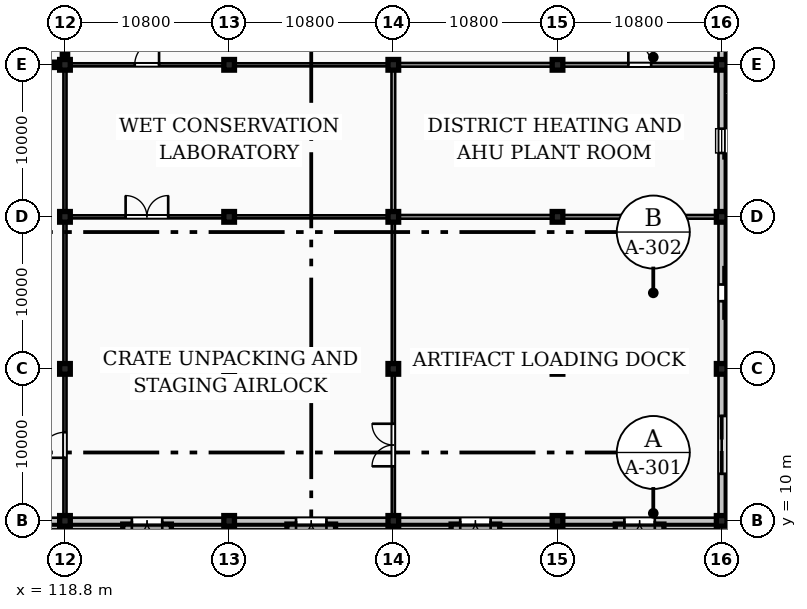
"""IFC4 building model, lengths in metres.
Left out: names, types, materials, properties, quantities, classifications, styles, units other than length and angle.
Written with IfcOpenShell. Run it as: python <this file> out.ifc"""

import sys

from ifc_helpers import new_model, si_unit, direction, frame, frame_2d, origin, origin_2d, place, context, subcontext, project, spatial, rectangle, extrude, element, fill, save


model = new_model("IFC4")
c1 = context("Model", 3, precision=1e-05, world=origin(), true_north=direction((0.0, 1.0)))
c2 = subcontext(c1, "Body", "Model", "MODEL_VIEW")
j1 = project(units=[si_unit("LENGTHUNIT", "METRE"), si_unit("PLANEANGLEUNIT", "RADIAN")], contexts=[c1])
p1 = place(None, origin())
s1 = spatial("IfcSite", under=j1, at=p1, CompositionType="ELEMENT")
p2 = place(p1, origin())
s2 = spatial("IfcBuilding", under=s1, at=p2, CompositionType="ELEMENT")
p3 = place(p2, origin())
s3 = spatial("IfcBuildingStorey", under=s2, at=p3, CompositionType="ELEMENT", Elevation=0.0)
for number, where, z_axis, x_axis in (
    (1, (118.8, 10.0, 0.0), (0.0, 0.0, 1.0), (1.0, 0.0, 0.0)),
    (2, (118.8, 20.0, 0.0), (0.0, 0.0, 1.0), (1.0, 0.0, 0.0)),
    (3, (118.8, 30.0, 0.0), (0.0, 0.0, 1.0), (1.0, 0.0, 0.0)),
    (4, (118.8, 40.0, 0.0), (0.0, 0.0, 1.0), (1.0, 0.0, 0.0)),
    (5, (129.6, 10.0, 0.0), (0.0, 0.0, 1.0), (1.0, 0.0, 0.0)),
    (6, (129.6, 20.0, 0.0), (0.0, 0.0, 1.0), (1.0, 0.0, 0.0)),
    (7, (129.6, 30.0, 0.0), (0.0, 0.0, 1.0), (1.0, 0.0, 0.0)),
    (8, (129.6, 40.0, 0.0), (0.0, 0.0, 1.0), (1.0, 0.0, 0.0)),
    (9, (140.4, 10.0, 0.0), (0.0, 0.0, 1.0), (1.0, 0.0, 0.0)),
    (10, (140.4, 20.0, 0.0), (0.0, 0.0, 1.0), (1.0, 0.0, 0.0)),
    (11, (140.4, 30.0, 0.0), (0.0, 0.0, 1.0), (1.0, 0.0, 0.0)),
    (12, (140.4, 40.0, 0.0), (0.0, 0.0, 1.0), (1.0, 0.0, 0.0)),
    (13, (151.2, 10.0, 0.0), (0.0, 0.0, 1.0), (1.0, 0.0, 0.0)),
    (14, (151.2, 20.0, 0.0), (0.0, 0.0, 1.0), (1.0, 0.0, 0.0)),
    (15, (151.2, 30.0, 0.0), (0.0, 0.0, 1.0), (1.0, 0.0, 0.0)),
    (16, (151.2, 40.0, 0.0), (0.0, 0.0, 1.0), (1.0, 0.0, 0.0)),
    (17, (162.0, 10.0, 0.0), (0.0, 0.0, 1.0), (1.0, 0.0, 0.0)),
    (18, (162.0, 20.0, 0.0), (0.0, 0.0, 1.0), (1.0, 0.0, 0.0)),
    (19, (162.0, 30.0, 0.0), (0.0, 0.0, 1.0), (1.0, 0.0, 0.0)),
    (20, (162.0, 40.0, 0.0), (0.0, 0.0, 1.0), (1.0, 0.0, 0.0)),
):
    element("IfcColumn", number, at=place(p3, frame(where, z_axis=z_axis, x_axis=x_axis)), inside=s3, PredefinedType="COLUMN", context=c2, shape_type="SweptSolid", body=[
        extrude(rectangle(XDim=0.7, YDim=0.7, at=origin_2d()), origin(), (0.0, 0.0, 1.0), 4.8),
    ])
p4 = place(p3, frame((108.2, 9.57, -1.38), z_axis=(0.0, 0.0, 1.0), x_axis=(1.0, 0.0, 0.0)))
e21 = element("IfcWall", 21, at=p4, inside=s3, PredefinedType="PARAPET", context=c2, shape_type="SweptSolid", body=[
    extrude(rectangle(XDim=53.6, YDim=0.26, at=frame_2d((26.8, 0.0))), origin(), (0.0, 0.0, 1.0), 1.36),
])
p5 = place(p3, frame((162.43, 10.45, -1.38), z_axis=(0.0, 0.0, 1.0), x_axis=(0.0, 1.0, 0.0)))
e22 = element("IfcWall", 22, at=p5, inside=s3, PredefinedType="PARAPET", context=c2, shape_type="SweptSolid", body=[
    extrude(rectangle(XDim=27.55, YDim=0.26, at=frame_2d((13.775, 0.0))), origin(), (0.0, 0.0, 1.0), 2.78),
])
p6 = place(p3, frame((162.43, 38.2, -1.38), z_axis=(0.0, 0.0, 1.0), x_axis=(0.0, 1.0, 0.0)))
e23 = element("IfcWall", 23, at=p6, inside=s3, PredefinedType="PARAPET", context=c2, shape_type="SweptSolid", body=[
    extrude(rectangle(XDim=23.35, YDim=0.26, at=frame_2d((11.675, 0.0))), origin(), (0.0, 0.0, 1.0), 4.18),
])
p7 = place(p3, frame((108.145, 10.0, 0.0), z_axis=(0.0, 0.0, 1.0), x_axis=(1.0, 0.0, 0.0)))
e24 = element("IfcWall", 24, at=p7, inside=s3, PredefinedType="STANDARD", context=c2, shape_type="SweptSolid", body=[
    extrude(rectangle(XDim=10.51, YDim=0.42, at=frame_2d((5.255, 0.0))), origin(), (0.0, 0.0, 1.0), 3.819),
])
p8 = place(p7, frame((4.255, 0.0, 0.0)))
e25 = element("IfcOpeningElement", 25, at=p8, cuts=e24, PredefinedType="OPENING", context=c2, shape_type="SweptSolid", body=[
    extrude(rectangle(XDim=2.0, YDim=2.3, at=frame_2d((1.0, 1.15))), frame((0.0, 0.22, 0.0), z_axis=(0.0, -1.0, 0.0), x_axis=(1.0, 0.0, 0.0)), (0.0, 0.0, 1.0), 0.44),
])
p9 = place(p3, frame((118.945, 10.0, 0.0), z_axis=(0.0, 0.0, 1.0), x_axis=(1.0, 0.0, 0.0)))
e26 = element("IfcWall", 26, at=p9, inside=s3, PredefinedType="STANDARD", context=c2, shape_type="SweptSolid", body=[
    extrude(rectangle(XDim=10.51, YDim=0.42, at=frame_2d((5.255, 0.0))), origin(), (0.0, 0.0, 1.0), 3.819),
])
p10 = place(p9, frame((4.255, 0.0, 0.0)))
e27 = element("IfcOpeningElement", 27, at=p10, cuts=e26, PredefinedType="OPENING", context=c2, shape_type="SweptSolid", body=[
    extrude(rectangle(XDim=2.0, YDim=2.3, at=frame_2d((1.0, 1.15))), frame((0.0, 0.22, 0.0), z_axis=(0.0, -1.0, 0.0), x_axis=(1.0, 0.0, 0.0)), (0.0, 0.0, 1.0), 0.44),
])
p11 = place(p3, frame((129.745, 10.0, 0.0), z_axis=(0.0, 0.0, 1.0), x_axis=(1.0, 0.0, 0.0)))
e28 = element("IfcWall", 28, at=p11, inside=s3, PredefinedType="STANDARD", context=c2, shape_type="SweptSolid", body=[
    extrude(rectangle(XDim=10.51, YDim=0.42, at=frame_2d((5.255, 0.0))), origin(), (0.0, 0.0, 1.0), 3.819),
])
p12 = place(p11, frame((4.255, 0.0, 0.0)))
e29 = element("IfcOpeningElement", 29, at=p12, cuts=e28, PredefinedType="OPENING", context=c2, shape_type="SweptSolid", body=[
    extrude(rectangle(XDim=2.0, YDim=2.3, at=frame_2d((1.0, 1.15))), frame((0.0, 0.22, 0.0), z_axis=(0.0, -1.0, 0.0), x_axis=(1.0, 0.0, 0.0)), (0.0, 0.0, 1.0), 0.44),
])
p13 = place(p3, frame((140.545, 10.0, 0.0), z_axis=(0.0, 0.0, 1.0), x_axis=(1.0, 0.0, 0.0)))
e30 = element("IfcWall", 30, at=p13, inside=s3, PredefinedType="STANDARD", context=c2, shape_type="SweptSolid", body=[
    extrude(rectangle(XDim=10.51, YDim=0.42, at=frame_2d((5.255, 0.0))), origin(), (0.0, 0.0, 1.0), 3.819),
])
p14 = place(p13, frame((4.255, 0.0, 0.0)))
e31 = element("IfcOpeningElement", 31, at=p14, cuts=e30, PredefinedType="OPENING", context=c2, shape_type="SweptSolid", body=[
    extrude(rectangle(XDim=2.0, YDim=2.3, at=frame_2d((1.0, 1.15))), frame((0.0, 0.22, 0.0), z_axis=(0.0, -1.0, 0.0), x_axis=(1.0, 0.0, 0.0)), (0.0, 0.0, 1.0), 0.44),
])
p15 = place(p3, frame((151.345, 10.0, 0.0), z_axis=(0.0, 0.0, 1.0), x_axis=(1.0, 0.0, 0.0)))
e32 = element("IfcWall", 32, at=p15, inside=s3, PredefinedType="STANDARD", context=c2, shape_type="SweptSolid", body=[
    extrude(rectangle(XDim=10.51, YDim=0.42, at=frame_2d((5.255, 0.0))), origin(), (0.0, 0.0, 1.0), 4.13),
])
p16 = place(p15, frame((4.255, 0.0, 0.0)))
e33 = element("IfcOpeningElement", 33, at=p16, cuts=e32, PredefinedType="OPENING", context=c2, shape_type="SweptSolid", body=[
    extrude(rectangle(XDim=2.0, YDim=2.3, at=frame_2d((1.0, 1.15))), frame((0.0, 0.22, 0.0), z_axis=(0.0, -1.0, 0.0), x_axis=(1.0, 0.0, 0.0)), (0.0, 0.0, 1.0), 0.44),
])
p17 = place(p3, frame((162.0, 10.145, 0.0), z_axis=(0.0, 0.0, 1.0), x_axis=(0.0, 1.0, 0.0)))
e34 = element("IfcWall", 34, at=p17, inside=s3, PredefinedType="STANDARD", context=c2, shape_type="SweptSolid", body=[
    extrude(rectangle(XDim=9.71, YDim=0.42, at=frame_2d((4.855, 0.0))), origin(), (0.0, 0.0, 1.0), 4.13),
])
p18 = place(p17, frame((2.955, 0.0, 0.0)))
e35 = element("IfcOpeningElement", 35, at=p18, cuts=e34, PredefinedType="OPENING", context=c2, shape_type="SweptSolid", body=[
    extrude(rectangle(XDim=3.8, YDim=4.0, at=frame_2d((1.9, 2.0))), frame((0.0, 0.22, 0.0), z_axis=(0.0, -1.0, 0.0), x_axis=(1.0, 0.0, 0.0)), (0.0, 0.0, 1.0), 0.44),
])
p19 = place(p3, frame((162.0, 20.145, 0.0), z_axis=(0.0, 0.0, 1.0), x_axis=(0.0, 1.0, 0.0)))
e36 = element("IfcWall", 36, at=p19, inside=s3, PredefinedType="STANDARD", context=c2, shape_type="SweptSolid", body=[
    extrude(rectangle(XDim=9.71, YDim=0.42, at=frame_2d((4.855, 0.0))), origin(), (0.0, 0.0, 1.0), 4.13),
])
p20 = place(p19, frame((4.305, 0.0, 0.0)))
e37 = element("IfcOpeningElement", 37, at=p20, cuts=e36, PredefinedType="OPENING", context=c2, shape_type="SweptSolid", body=[
    extrude(rectangle(XDim=1.1, YDim=2.2, at=frame_2d((0.55, 1.1))), frame((0.0, 0.22, 0.0), z_axis=(0.0, -1.0, 0.0), x_axis=(1.0, 0.0, 0.0)), (0.0, 0.0, 1.0), 0.44),
])
p21 = place(p3, frame((162.0, 30.145, 0.0), z_axis=(0.0, 0.0, 1.0), x_axis=(0.0, 1.0, 0.0)))
e38 = element("IfcWall", 38, at=p21, inside=s3, PredefinedType="STANDARD", context=c2, shape_type="SweptSolid", body=[
    extrude(rectangle(XDim=9.71, YDim=0.42, at=frame_2d((4.855, 0.0))), origin(), (0.0, 0.0, 1.0), 4.13),
])
p22 = place(p21, frame((4.055, 0.0, 1.2)))
e39 = element("IfcOpeningElement", 39, at=p22, cuts=e38, PredefinedType="OPENING", context=c2, shape_type="SweptSolid", body=[
    extrude(rectangle(XDim=1.6, YDim=1.8, at=frame_2d((0.8, 0.9))), frame((0.0, 0.22, 0.0), z_axis=(0.0, -1.0, 0.0), x_axis=(1.0, 0.0, 0.0)), (0.0, 0.0, 1.0), 0.44),
])
p23 = place(p3, frame((162.0, 40.145, 0.0), z_axis=(0.0, 0.0, 1.0), x_axis=(0.0, 1.0, 0.0)))
e40 = element("IfcWall", 40, at=p23, inside=s3, PredefinedType="STANDARD", context=c2, shape_type="SweptSolid", body=[
    extrude(rectangle(XDim=9.71, YDim=0.42, at=frame_2d((4.855, 0.0))), origin(), (0.0, 0.0, 1.0), 4.13),
])
p24 = place(p23, frame((4.055, 0.0, 1.2)))
e41 = element("IfcOpeningElement", 41, at=p24, cuts=e40, PredefinedType="OPENING", context=c2, shape_type="SweptSolid", body=[
    extrude(rectangle(XDim=1.6, YDim=1.8, at=frame_2d((0.8, 0.9))), frame((0.0, 0.22, 0.0), z_axis=(0.0, -1.0, 0.0), x_axis=(1.0, 0.0, 0.0)), (0.0, 0.0, 1.0), 0.44),
])
p25 = place(p3, frame((108.35, 40.0, 0.0), z_axis=(0.0, 0.0, 1.0), x_axis=(1.0, 0.0, 0.0)))
e42 = element("IfcWall", 42, at=p25, inside=s3, PredefinedType="SHEAR", context=c2, shape_type="SweptSolid", body=[
    extrude(rectangle(XDim=10.1, YDim=0.35, at=frame_2d((5.05, 0.0))), origin(), (0.0, 0.0, 1.0), 4.56),
])
p26 = place(p3, frame((118.8, 40.35, 0.0), z_axis=(0.0, 0.0, 1.0), x_axis=(0.0, 1.0, 0.0)))
e43 = element("IfcWall", 43, at=p26, inside=s3, PredefinedType="SHEAR", context=c2, shape_type="SweptSolid", body=[
    extrude(rectangle(XDim=9.3, YDim=0.35, at=frame_2d((4.65, 0.0))), origin(), (0.0, 0.0, 1.0), 4.56),
])
p27 = place(p26, frame((0.83, 0.0, 0.0)))
e44 = element("IfcOpeningElement", 44, at=p27, cuts=e43, PredefinedType="OPENING", context=c2, shape_type="SweptSolid", body=[
    extrude(rectangle(XDim=1.8, YDim=2.25, at=frame_2d((0.9, 1.125))), frame((0.0, 0.185, 0.0), z_axis=(0.0, -1.0, 0.0), x_axis=(1.0, 0.0, 0.0)), (0.0, 0.0, 1.0), 0.37),
])
p28 = place(p3, frame((118.98, 30.0, 0.0), z_axis=(0.0, 0.0, 1.0), x_axis=(1.0, 0.0, 0.0)))
e45 = element("IfcWall", 45, at=p28, inside=s3, PredefinedType="SOLIDWALL", context=c2, shape_type="SweptSolid", body=[
    extrude(rectangle(XDim=10.42, YDim=0.2, at=frame_2d((5.21, 0.0))), origin(), (0.0, 0.0, 1.0), 3.819),
])
p29 = place(p28, frame((3.81, 0.0, 0.0)))
e46 = element("IfcOpeningElement", 46, at=p29, cuts=e45, PredefinedType="OPENING", context=c2, shape_type="SweptSolid", body=[
    extrude(rectangle(XDim=2.8, YDim=2.9, at=frame_2d((1.4, 1.45))), frame((0.0, 0.11, 0.0), z_axis=(0.0, -1.0, 0.0), x_axis=(1.0, 0.0, 0.0)), (0.0, 0.0, 1.0), 0.22),
])
p30 = place(p3, frame((129.8, 30.0, 0.0), z_axis=(0.0, 0.0, 1.0), x_axis=(1.0, 0.0, 0.0)))
e47 = element("IfcWall", 47, at=p30, inside=s3, PredefinedType="SOLIDWALL", context=c2, shape_type="SweptSolid", body=[
    extrude(rectangle(XDim=10.4, YDim=0.2, at=frame_2d((5.2, 0.0))), origin(), (0.0, 0.0, 1.0), 3.819),
])
p31 = place(p3, frame((118.98, 40.0, 0.0), z_axis=(0.0, 0.0, 1.0), x_axis=(1.0, 0.0, 0.0)))
e48 = element("IfcWall", 48, at=p31, inside=s3, PredefinedType="SOLIDWALL", context=c2, shape_type="SweptSolid", body=[
    extrude(rectangle(XDim=10.42, YDim=0.2, at=frame_2d((5.21, 0.0))), origin(), (0.0, 0.0, 1.0), 3.819),
])
p32 = place(p31, frame((4.41, 0.0, 0.0)))
e49 = element("IfcOpeningElement", 49, at=p32, cuts=e48, PredefinedType="OPENING", context=c2, shape_type="SweptSolid", body=[
    extrude(rectangle(XDim=1.6, YDim=2.3, at=frame_2d((0.8, 1.15))), frame((0.0, 0.11, 0.0), z_axis=(0.0, -1.0, 0.0), x_axis=(1.0, 0.0, 0.0)), (0.0, 0.0, 1.0), 0.22),
])
p33 = place(p3, frame((129.8, 40.0, 0.0), z_axis=(0.0, 0.0, 1.0), x_axis=(1.0, 0.0, 0.0)))
e50 = element("IfcWall", 50, at=p33, inside=s3, PredefinedType="SOLIDWALL", context=c2, shape_type="SweptSolid", body=[
    extrude(rectangle(XDim=10.4, YDim=0.2, at=frame_2d((5.2, 0.0))), origin(), (0.0, 0.0, 1.0), 3.819),
])
p34 = place(p3, frame((140.6, 40.0, 0.0), z_axis=(0.0, 0.0, 1.0), x_axis=(1.0, 0.0, 0.0)))
e51 = element("IfcWall", 51, at=p34, inside=s3, PredefinedType="SOLIDWALL", context=c2, shape_type="SweptSolid", body=[
    extrude(rectangle(XDim=10.4, YDim=0.24, at=frame_2d((5.2, 0.0))), origin(), (0.0, 0.0, 1.0), 3.819),
])
p35 = place(p3, frame((151.4, 40.0, 0.0), z_axis=(0.0, 0.0, 1.0), x_axis=(1.0, 0.0, 0.0)))
e52 = element("IfcWall", 52, at=p35, inside=s3, PredefinedType="SOLIDWALL", context=c2, shape_type="SweptSolid", body=[
    extrude(rectangle(XDim=10.42, YDim=0.24, at=frame_2d((5.21, 0.0))), origin(), (0.0, 0.0, 1.0), 4.13),
])
p36 = place(p35, frame((4.46, 0.0, 0.0)))
e53 = element("IfcOpeningElement", 53, at=p36, cuts=e52, PredefinedType="OPENING", context=c2, shape_type="SweptSolid", body=[
    extrude(rectangle(XDim=1.5, YDim=2.3, at=frame_2d((0.75, 1.15))), frame((0.0, 0.13, 0.0), z_axis=(0.0, -1.0, 0.0), x_axis=(1.0, 0.0, 0.0)), (0.0, 0.0, 1.0), 0.26),
])
p37 = place(p3, frame((118.8, 10.18, 0.0), z_axis=(0.0, 0.0, 1.0), x_axis=(0.0, 1.0, 0.0)))
e54 = element("IfcWall", 54, at=p37, inside=s3, PredefinedType="SOLIDWALL", context=c2, shape_type="SweptSolid", body=[
    extrude(rectangle(XDim=9.62, YDim=0.2, at=frame_2d((4.81, 0.0))), origin(), (0.0, 0.0, 1.0), 3.97),
])
p38 = place(p37, frame((3.97, 0.0, 0.0)))
e55 = element("IfcOpeningElement", 55, at=p38, cuts=e54, PredefinedType="OPENING", context=c2, shape_type="SweptSolid", body=[
    extrude(rectangle(XDim=1.68, YDim=2.52, at=frame_2d((0.84, 1.26))), frame((0.0, 0.11, 0.0), z_axis=(0.0, -1.0, 0.0), x_axis=(1.0, 0.0, 0.0)), (0.0, 0.0, 1.0), 0.22),
])
p39 = place(p3, frame((118.8, 20.2, 0.0), z_axis=(0.0, 0.0, 1.0), x_axis=(0.0, 1.0, 0.0)))
e56 = element("IfcWall", 56, at=p39, inside=s3, PredefinedType="SOLIDWALL", context=c2, shape_type="SweptSolid", body=[
    extrude(rectangle(XDim=9.6, YDim=0.2, at=frame_2d((4.8, 0.0))), origin(), (0.0, 0.0, 1.0), 3.97),
])
p40 = place(p3, frame((140.4, 10.18, 0.0), z_axis=(0.0, 0.0, 1.0), x_axis=(0.0, 1.0, 0.0)))
e57 = element("IfcWall", 57, at=p40, inside=s3, PredefinedType="SOLIDWALL", context=c2, shape_type="SweptSolid", body=[
    extrude(rectangle(XDim=9.62, YDim=0.2, at=frame_2d((4.81, 0.0))), origin(), (0.0, 0.0, 1.0), 3.97),
])
p41 = place(p40, frame((3.41, 0.0, 0.0)))
e58 = element("IfcOpeningElement", 58, at=p41, cuts=e57, PredefinedType="OPENING", context=c2, shape_type="SweptSolid", body=[
    extrude(rectangle(XDim=2.8, YDim=2.9, at=frame_2d((1.4, 1.45))), frame((0.0, 0.11, 0.0), z_axis=(0.0, -1.0, 0.0), x_axis=(1.0, 0.0, 0.0)), (0.0, 0.0, 1.0), 0.22),
])
p42 = place(p3, frame((140.4, 20.2, 0.0), z_axis=(0.0, 0.0, 1.0), x_axis=(0.0, 1.0, 0.0)))
e59 = element("IfcWall", 59, at=p42, inside=s3, PredefinedType="SOLIDWALL", context=c2, shape_type="SweptSolid", body=[
    extrude(rectangle(XDim=9.6, YDim=0.2, at=frame_2d((4.8, 0.0))), origin(), (0.0, 0.0, 1.0), 3.97),
])
p43 = place(p3, frame((140.6, 30.0, 0.0), z_axis=(0.0, 0.0, 1.0), x_axis=(1.0, 0.0, 0.0)))
e60 = element("IfcWall", 60, at=p43, inside=s3, PredefinedType="SOLIDWALL", context=c2, shape_type="SweptSolid", body=[
    extrude(rectangle(XDim=10.4, YDim=0.24, at=frame_2d((5.2, 0.0))), origin(), (0.0, 0.0, 1.0), 3.819),
])
p44 = place(p3, frame((151.4, 30.0, 0.0), z_axis=(0.0, 0.0, 1.0), x_axis=(1.0, 0.0, 0.0)))
e61 = element("IfcWall", 61, at=p44, inside=s3, PredefinedType="SOLIDWALL", context=c2, shape_type="SweptSolid", body=[
    extrude(rectangle(XDim=10.42, YDim=0.24, at=frame_2d((5.21, 0.0))), origin(), (0.0, 0.0, 1.0), 4.13),
])
p45 = place(p3, frame((118.8, 30.2, 0.0), z_axis=(0.0, 0.0, 1.0), x_axis=(0.0, 1.0, 0.0)))
e62 = element("IfcWall", 62, at=p45, inside=s3, PredefinedType="SOLIDWALL", context=c2, shape_type="SweptSolid", body=[
    extrude(rectangle(XDim=9.62, YDim=0.2, at=frame_2d((4.81, 0.0))), origin(), (0.0, 0.0, 1.0), 3.97),
])
p46 = place(p3, frame((140.4, 30.2, 0.0), z_axis=(0.0, 0.0, 1.0), x_axis=(0.0, 1.0, 0.0)))
e63 = element("IfcWall", 63, at=p46, inside=s3, PredefinedType="SOLIDWALL", context=c2, shape_type="SweptSolid", body=[
    extrude(rectangle(XDim=9.62, YDim=0.24, at=frame_2d((4.81, 0.0))), origin(), (0.0, 0.0, 1.0), 3.97),
])
p47 = place(p10, frame((2.0, 0.0, 0.0), z_axis=(0.0, 0.0, 1.0), x_axis=(-1.0, 0.0, 0.0)))
e64 = element("IfcDoor", 64, at=p47, inside=s3, OperationType="DOUBLE_DOOR_SINGLE_SWING", PredefinedType="DOOR", context=c2, shape_type="SweptSolid", body=[
    extrude(rectangle(XDim=2.0, YDim=2.3, at=frame_2d((1.0, 1.15))), frame((0.0, 0.025, 0.0), z_axis=(0.0, -1.0, 0.0), x_axis=(1.0, 0.0, 0.0)), (0.0, 0.0, 1.0), 0.05),
])
fill(e27, e64)
p48 = place(p12, frame((2.0, 0.0, 0.0), z_axis=(0.0, 0.0, 1.0), x_axis=(-1.0, 0.0, 0.0)))
e65 = element("IfcDoor", 65, at=p48, inside=s3, OperationType="DOUBLE_DOOR_SINGLE_SWING", PredefinedType="DOOR", context=c2, shape_type="SweptSolid", body=[
    extrude(rectangle(XDim=2.0, YDim=2.3, at=frame_2d((1.0, 1.15))), frame((0.0, 0.025, 0.0), z_axis=(0.0, -1.0, 0.0), x_axis=(1.0, 0.0, 0.0)), (0.0, 0.0, 1.0), 0.05),
])
fill(e29, e65)
p49 = place(p14, frame((2.0, 0.0, 0.0), z_axis=(0.0, 0.0, 1.0), x_axis=(-1.0, 0.0, 0.0)))
e66 = element("IfcDoor", 66, at=p49, inside=s3, OperationType="DOUBLE_DOOR_SINGLE_SWING", PredefinedType="DOOR", context=c2, shape_type="SweptSolid", body=[
    extrude(rectangle(XDim=2.0, YDim=2.3, at=frame_2d((1.0, 1.15))), frame((0.0, 0.025, 0.0), z_axis=(0.0, -1.0, 0.0), x_axis=(1.0, 0.0, 0.0)), (0.0, 0.0, 1.0), 0.05),
])
fill(e31, e66)
p50 = place(p16, frame((2.0, 0.0, 0.0), z_axis=(0.0, 0.0, 1.0), x_axis=(-1.0, 0.0, 0.0)))
e67 = element("IfcDoor", 67, at=p50, inside=s3, OperationType="DOUBLE_DOOR_SINGLE_SWING", PredefinedType="DOOR", context=c2, shape_type="SweptSolid", body=[
    extrude(rectangle(XDim=2.0, YDim=2.3, at=frame_2d((1.0, 1.15))), frame((0.0, 0.025, 0.0), z_axis=(0.0, -1.0, 0.0), x_axis=(1.0, 0.0, 0.0)), (0.0, 0.0, 1.0), 0.05),
])
fill(e33, e67)
p51 = place(p18, frame((3.8, 0.0, 0.0), z_axis=(0.0, 0.0, 1.0), x_axis=(-1.0, 0.0, 0.0)))
e68 = element("IfcDoor", 68, at=p51, inside=s3, OperationType="ROLLINGUP", PredefinedType="GATE", context=c2, shape_type="SweptSolid", body=[
    extrude(rectangle(XDim=3.8, YDim=4.0, at=frame_2d((1.9, 2.0))), frame((0.0, 0.025, 0.0), z_axis=(0.0, -1.0, 0.0), x_axis=(1.0, 0.0, 0.0)), (0.0, 0.0, 1.0), 0.05),
])
fill(e35, e68)
p52 = place(p20, frame((1.1, 0.0, 0.0), z_axis=(0.0, 0.0, 1.0), x_axis=(-1.0, 0.0, 0.0)))
e69 = element("IfcDoor", 69, at=p52, inside=s3, OperationType="SINGLE_SWING_LEFT", PredefinedType="DOOR", context=c2, shape_type="SweptSolid", body=[
    extrude(rectangle(XDim=1.1, YDim=2.2, at=frame_2d((0.55, 1.1))), frame((0.0, 0.025, 0.0), z_axis=(0.0, -1.0, 0.0), x_axis=(1.0, 0.0, 0.0)), (0.0, 0.0, 1.0), 0.05),
])
fill(e37, e69)
p53 = place(p22, origin())
e70 = element("IfcWindow", 70, at=p53, inside=s3, PartitioningType="SINGLE_PANEL", PredefinedType="WINDOW", context=c2, shape_type="SweptSolid", body=[
    extrude(rectangle(XDim=1.6, YDim=1.8, at=frame_2d((0.8, 0.9))), frame((0.0, 0.03, 0.0), z_axis=(0.0, -1.0, 0.0), x_axis=(1.0, 0.0, 0.0)), (0.0, 0.0, 1.0), 0.06),
])
fill(e39, e70)
p54 = place(p29, origin())
e71 = element("IfcDoor", 71, at=p54, inside=s3, OperationType="DOUBLE_DOOR_SINGLE_SWING", PredefinedType="GATE", context=c2, shape_type="SweptSolid", body=[
    extrude(rectangle(XDim=2.8, YDim=2.9, at=frame_2d((1.4, 1.45))), frame((0.0, 0.025, 0.0), z_axis=(0.0, -1.0, 0.0), x_axis=(1.0, 0.0, 0.0)), (0.0, 0.0, 1.0), 0.05),
])
fill(e46, e71)
p55 = place(p32, origin())
e72 = element("IfcDoor", 72, at=p55, inside=s3, OperationType="SINGLE_SWING_RIGHT", PredefinedType="DOOR", context=c2, shape_type="SweptSolid", body=[
    extrude(rectangle(XDim=1.6, YDim=2.3, at=frame_2d((0.8, 1.15))), frame((0.0, 0.025, 0.0), z_axis=(0.0, -1.0, 0.0), x_axis=(1.0, 0.0, 0.0)), (0.0, 0.0, 1.0), 0.05),
])
fill(e49, e72)
p56 = place(p36, origin())
e73 = element("IfcDoor", 73, at=p56, inside=s3, OperationType="SINGLE_SWING_LEFT", PredefinedType="DOOR", context=c2, shape_type="SweptSolid", body=[
    extrude(rectangle(XDim=1.5, YDim=2.3, at=frame_2d((0.75, 1.15))), frame((0.0, 0.025, 0.0), z_axis=(0.0, -1.0, 0.0), x_axis=(1.0, 0.0, 0.0)), (0.0, 0.0, 1.0), 0.05),
])
fill(e53, e73)
p57 = place(p38, origin())
e74 = element("IfcDoor", 74, at=p57, inside=s3, OperationType="SINGLE_SWING_LEFT", PredefinedType="DOOR", context=c2, shape_type="SweptSolid", body=[
    extrude(rectangle(XDim=1.68, YDim=2.52, at=frame_2d((0.84, 1.26))), frame((0.0, 0.025, 0.0), z_axis=(0.0, -1.0, 0.0), x_axis=(1.0, 0.0, 0.0)), (0.0, 0.0, 1.0), 0.05),
])
fill(e55, e74)
p58 = place(p41, origin())
e75 = element("IfcDoor", 75, at=p58, inside=s3, OperationType="DOUBLE_DOOR_SINGLE_SWING", PredefinedType="GATE", context=c2, shape_type="SweptSolid", body=[
    extrude(rectangle(XDim=2.8, YDim=2.9, at=frame_2d((1.4, 1.45))), frame((0.0, 0.025, 0.0), z_axis=(0.0, -1.0, 0.0), x_axis=(1.0, 0.0, 0.0)), (0.0, 0.0, 1.0), 0.05),
])
fill(e58, e75)
save(model, sys.argv[1])
